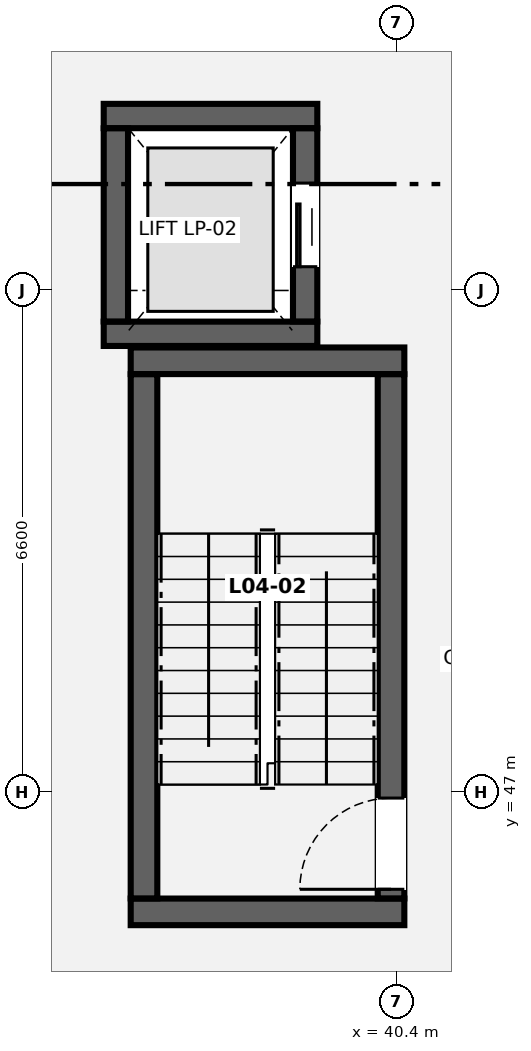
"""IFC4 building model, lengths in metres.
Left out: names, types, materials, properties, quantities, classifications, styles, units other than length and angle.
Written with IfcOpenShell. Run it as: python <this file> out.ifc"""

import sys

from ifc_helpers import new_model, si_unit, direction, frame, frame_2d, origin, place, context, subcontext, project, spatial, rectangle, extrude, element, fill, save


model = new_model("IFC4")
c1 = context("Model", 3, precision=1e-05, world=origin(), true_north=direction((0.0, 1.0)))
c2 = subcontext(c1, "Body", "Model", "MODEL_VIEW")
j1 = project(units=[si_unit("LENGTHUNIT", "METRE"), si_unit("PLANEANGLEUNIT", "RADIAN")], contexts=[c1])
p1 = place(None, origin())
s1 = spatial("IfcSite", under=j1, at=p1, CompositionType="ELEMENT")
p2 = place(p1, origin())
s2 = spatial("IfcBuilding", under=s1, at=p2, CompositionType="ELEMENT")
p3 = place(p2, frame((0.0, 0.0, 17.5)))
s3 = spatial("IfcBuildingStorey", under=s2, at=p3, CompositionType="ELEMENT", Elevation=17.5)
for number, where, z_axis, x_axis in (
    (1, (36.9, 45.425, 0.0), (0.0, 0.0, 1.0), (1.0, 0.0, 0.0)),
    (2, (36.9, 52.675, 0.0), (0.0, 0.0, 1.0), (1.0, 0.0, 0.0)),
):
    element("IfcWall", number, at=place(p3, frame(where, z_axis=z_axis, x_axis=x_axis)), inside=s3, PredefinedType="SHEAR", context=c2, shape_type="SweptSolid", body=[
        extrude(rectangle(XDim=3.6, YDim=0.35, at=frame_2d((1.8, 0.0))), origin(), (0.0, 0.0, 1.0), 4.0),
    ])
p4 = place(p3, frame((37.075, 45.602, 0.0), z_axis=(0.0, 0.0, 1.0), x_axis=(0.0, 1.0, 0.0)))
e3 = element("IfcWall", 3, at=p4, inside=s3, PredefinedType="SHEAR", context=c2, shape_type="SweptSolid", body=[
    extrude(rectangle(XDim=6.896, YDim=0.35, at=frame_2d((3.448, 0.0))), origin(), (0.0, 0.0, 1.0), 4.0),
])
p5 = place(p3, frame((40.325, 45.602, 0.0), z_axis=(0.0, 0.0, 1.0), x_axis=(0.0, 1.0, 0.0)))
e4 = element("IfcWall", 4, at=p5, inside=s3, PredefinedType="SHEAR", context=c2, shape_type="SweptSolid", body=[
    extrude(rectangle(XDim=6.896, YDim=0.35, at=frame_2d((3.448, 0.0))), origin(), (0.0, 0.0, 1.0), 4.0),
])
p6 = place(p5, frame((0.12, 0.0, 0.0)))
e5 = element("IfcOpeningElement", 5, at=p6, cuts=e4, PredefinedType="OPENING", context=c2, shape_type="SweptSolid", body=[
    extrude(rectangle(XDim=1.2, YDim=2.15, at=frame_2d((0.6, 1.075))), frame((0.0, 0.185, 0.0), z_axis=(0.0, -1.0, 0.0), x_axis=(1.0, 0.0, 0.0)), (0.0, 0.0, 1.0), 0.37),
])
for number, where, z_axis, x_axis in (
    (6, (36.545, 53.03, 0.0), (0.0, 0.0, 1.0), (1.0, 0.0, 0.0)),
    (7, (36.545, 55.895, 0.0), (0.0, 0.0, 1.0), (1.0, 0.0, 0.0)),
):
    element("IfcWall", number, at=place(p3, frame(where, z_axis=z_axis, x_axis=x_axis)), inside=s3, PredefinedType="SHEAR", context=c2, shape_type="SweptSolid", body=[
        extrude(rectangle(XDim=2.81, YDim=0.32, at=frame_2d((1.405, 0.0))), origin(), (0.0, 0.0, 1.0), 4.0),
    ])
p7 = place(p3, frame((36.705, 53.192, 0.0), z_axis=(0.0, 0.0, 1.0), x_axis=(0.0, 1.0, 0.0)))
e8 = element("IfcWall", 8, at=p7, inside=s3, PredefinedType="SHEAR", context=c2, shape_type="SweptSolid", body=[
    extrude(rectangle(XDim=2.541, YDim=0.32, at=frame_2d((1.271, 0.0))), origin(), (0.0, 0.0, 1.0), 4.0),
])
p8 = place(p3, frame((39.195, 53.192, 0.0), z_axis=(0.0, 0.0, 1.0), x_axis=(0.0, 1.0, 0.0)))
e9 = element("IfcWall", 9, at=p8, inside=s3, PredefinedType="SHEAR", context=c2, shape_type="SweptSolid", body=[
    extrude(rectangle(XDim=2.541, YDim=0.32, at=frame_2d((1.271, 0.0))), origin(), (0.0, 0.0, 1.0), 4.0),
])
p9 = place(p8, frame((0.72, 0.0, 0.0)))
e10 = element("IfcOpeningElement", 10, at=p9, cuts=e9, PredefinedType="OPENING", context=c2, shape_type="SweptSolid", body=[
    extrude(rectangle(XDim=1.1, YDim=2.15, at=frame_2d((0.55, 1.075))), frame((0.0, 0.17, 0.0), z_axis=(0.0, -1.0, 0.0), x_axis=(1.0, 0.0, 0.0)), (0.0, 0.0, 1.0), 0.34),
])
p10 = place(p6, origin())
e11 = element("IfcDoor", 11, at=p10, inside=s3, OperationType="SINGLE_SWING_LEFT", PredefinedType="DOOR", context=c2, shape_type="SweptSolid", body=[
    extrude(rectangle(XDim=1.2, YDim=2.15, at=frame_2d((0.6, 1.075))), frame((0.0, 0.025, 0.0), z_axis=(0.0, -1.0, 0.0), x_axis=(1.0, 0.0, 0.0)), (0.0, 0.0, 1.0), 0.05),
])
fill(e5, e11)
p11 = place(p9, origin())
e12 = element("IfcDoor", 12, at=p11, inside=s3, OperationType="SLIDING_TO_LEFT", PredefinedType="DOOR", context=c2, shape_type="SweptSolid", body=[
    extrude(rectangle(XDim=1.1, YDim=2.15, at=frame_2d((0.55, 1.075))), frame((0.0, 0.025, 0.0), z_axis=(0.0, -1.0, 0.0), x_axis=(1.0, 0.0, 0.0)), (0.0, 0.0, 1.0), 0.05),
])
fill(e10, e12)
save(model, sys.argv[1])
